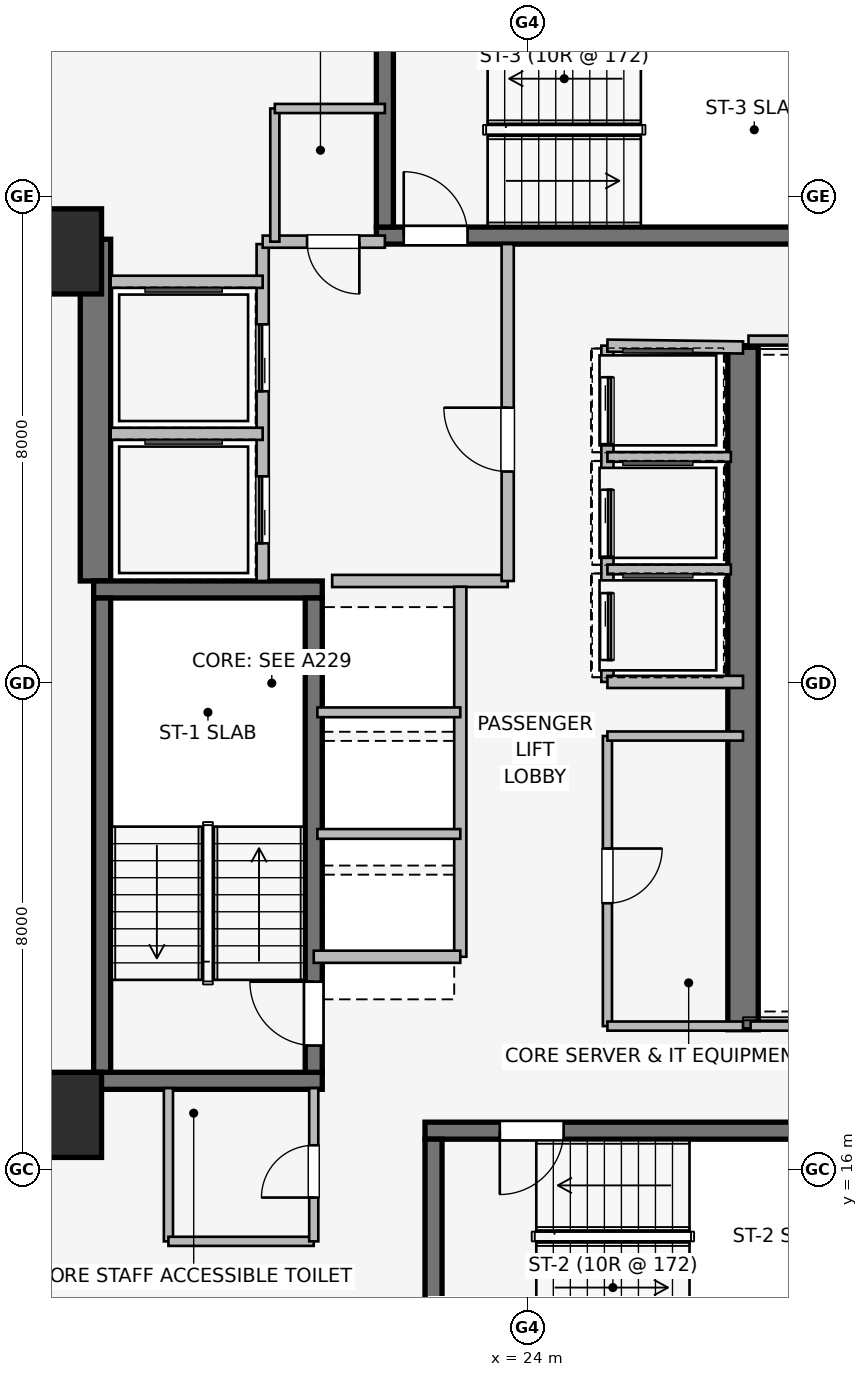
"""IFC4 building model, lengths in metres.
Left out: names, types, materials, properties, quantities, classifications, styles, units other than length and angle.
Written with IfcOpenShell. Run it as: python <this file> out.ifc"""

import sys

from ifc_helpers import new_model, si_unit, direction, frame, frame_2d, origin, origin_2d, place, context, subcontext, project, spatial, rectangle, extrude, element, fill, save


model = new_model("IFC4")
c1 = context("Model", 3, precision=1e-05, world=origin(), true_north=direction((0.0, 1.0)))
c2 = subcontext(c1, "Body", "Model", "MODEL_VIEW")
j1 = project(units=[si_unit("LENGTHUNIT", "METRE"), si_unit("PLANEANGLEUNIT", "RADIAN")], contexts=[c1])
p1 = place(None, origin())
s1 = spatial("IfcSite", under=j1, at=p1, CompositionType="ELEMENT")
p2 = place(p1, origin())
s2 = spatial("IfcBuilding", under=s1, at=p2, CompositionType="ELEMENT")
p3 = place(p2, frame((0.0, 0.0, 105.0)))
s3 = spatial("IfcBuildingStorey", under=s2, at=p3, CompositionType="ELEMENT", Elevation=105.0)
p4 = place(p3, frame((16.9, 25.68, 0.0), z_axis=(0.0, 0.0, 1.0), x_axis=(0.0, 1.0, 0.0)))
e1 = element("IfcWall", 1, at=p4, inside=s3, PredefinedType="SHEAR", context=c2, shape_type="SweptSolid", body=[
    extrude(rectangle(XDim=5.62, YDim=0.5, at=frame_2d((2.81, 0.0))), origin(), (0.0, 0.0, 1.0), 3.45),
])
p5 = place(p3, frame((27.55, 29.55, 0.0), z_axis=(0.0, 0.0, 1.0), x_axis=(0.0, -1.0, 0.0)))
e2 = element("IfcWall", 2, at=p5, inside=s3, PredefinedType="SHEAR", context=c2, shape_type="SweptSolid", body=[
    extrude(rectangle(XDim=11.25, YDim=0.5, at=frame_2d((5.625, 0.0))), origin(), (0.0, 0.0, 1.0), 3.45),
])
for number, where, z_axis, x_axis in (
    (3, (16.87, 17.46, 0.0), (0.0, 0.0, 1.0), (1.0, 0.0, 0.0)),
    (4, (20.63, 25.54, 0.0), (0.0, 0.0, 1.0), (-1.0, 0.0, 0.0)),
):
    element("IfcWall", number, at=place(p3, frame(where, z_axis=z_axis, x_axis=x_axis)), inside=s3, PredefinedType="SHEAR", context=c2, shape_type="SweptSolid", body=[
        extrude(rectangle(XDim=3.76, YDim=0.28, at=frame_2d((1.88, 0.0))), origin(), (0.0, 0.0, 1.0), 3.45),
    ])
p6 = place(p3, frame((17.01, 25.4, 0.0), z_axis=(0.0, 0.0, 1.0), x_axis=(0.0, -1.0, 0.0)))
e5 = element("IfcWall", 5, at=p6, inside=s3, PredefinedType="SHEAR", context=c2, shape_type="SweptSolid", body=[
    extrude(rectangle(XDim=7.8, YDim=0.28, at=frame_2d((3.9, 0.0))), origin(), (0.0, 0.0, 1.0), 3.45),
])
p7 = place(p3, frame((20.49, 17.6, 0.0), z_axis=(0.0, 0.0, 1.0), x_axis=(0.0, 1.0, 0.0)))
e6 = element("IfcWall", 6, at=p7, inside=s3, PredefinedType="SHEAR", context=c2, shape_type="SweptSolid", body=[
    extrude(rectangle(XDim=7.8, YDim=0.28, at=frame_2d((3.9, 0.0))), origin(), (0.0, 0.0, 1.0), 3.45),
])
p8 = place(p7, frame((0.44, 0.0, 0.0)))
e7 = element("IfcOpeningElement", 7, at=p8, cuts=e6, PredefinedType="OPENING", context=c2, shape_type="SweptSolid", body=[
    extrude(rectangle(XDim=1.05, YDim=2.0, at=frame_2d((0.525, 1.0))), frame((0.0, 0.15, 0.0), z_axis=(0.0, -1.0, 0.0), x_axis=(1.0, 0.0, 0.0)), (0.0, 0.0, 1.0), 0.3),
])
p9 = place(p3, frame((30.68, 16.64, 0.0), z_axis=(0.0, 0.0, 1.0), x_axis=(-1.0, 0.0, 0.0)))
e8 = element("IfcWall", 8, at=p9, inside=s3, PredefinedType="SHEAR", context=c2, shape_type="SweptSolid", body=[
    extrude(rectangle(XDim=8.36, YDim=0.28, at=frame_2d((4.18, 0.0))), origin(), (0.0, 0.0, 1.0), 3.45),
])
p10 = place(p9, frame((6.08, 0.0, 0.0)))
e9 = element("IfcOpeningElement", 9, at=p10, cuts=e8, PredefinedType="OPENING", context=c2, shape_type="SweptSolid", body=[
    extrude(rectangle(XDim=1.05, YDim=2.0, at=frame_2d((0.525, 1.0))), frame((0.0, 0.15, 0.0), z_axis=(0.0, -1.0, 0.0), x_axis=(1.0, 0.0, 0.0)), (0.0, 0.0, 1.0), 0.3),
])
p11 = place(p3, frame((22.46, 16.5, 0.0), z_axis=(0.0, 0.0, 1.0), x_axis=(0.0, -1.0, 0.0)))
e10 = element("IfcWall", 10, at=p11, inside=s3, PredefinedType="SHEAR", context=c2, shape_type="SweptSolid", body=[
    extrude(rectangle(XDim=3.2, YDim=0.28, at=frame_2d((1.6, 0.0))), origin(), (0.0, 0.0, 1.0), 3.45),
])
p12 = place(p3, frame((21.52, 31.36, 0.0), z_axis=(0.0, 0.0, 1.0), x_axis=(1.0, 0.0, 0.0)))
e11 = element("IfcWall", 11, at=p12, inside=s3, PredefinedType="SHEAR", context=c2, shape_type="SweptSolid", body=[
    extrude(rectangle(XDim=8.36, YDim=0.28, at=frame_2d((4.18, 0.0))), origin(), (0.0, 0.0, 1.0), 3.45),
])
p13 = place(p12, frame((0.45, 0.0, 0.0)))
e12 = element("IfcOpeningElement", 12, at=p13, cuts=e11, PredefinedType="OPENING", context=c2, shape_type="SweptSolid", body=[
    extrude(rectangle(XDim=1.05, YDim=2.0, at=frame_2d((0.525, 1.0))), frame((0.0, 0.15, 0.0), z_axis=(0.0, -1.0, 0.0), x_axis=(1.0, 0.0, 0.0)), (0.0, 0.0, 1.0), 0.3),
])
p14 = place(p3, frame((21.66, 34.7, 0.0), z_axis=(0.0, 0.0, 1.0), x_axis=(0.0, -1.0, 0.0)))
e13 = element("IfcWall", 13, at=p14, inside=s3, PredefinedType="SHEAR", context=c2, shape_type="SweptSolid", body=[
    extrude(rectangle(XDim=3.2, YDim=0.28, at=frame_2d((1.6, 0.0))), origin(), (0.0, 0.0, 1.0), 3.45),
])
for number, where, z_axis, x_axis in (
    (14, (16.3, 16.9, 0.0), (0.0, 0.0, 1.0), (1.0, 0.0, 0.0)),
    (15, (16.3, 31.1, 0.0), (0.0, 0.0, 1.0), (1.0, 0.0, 0.0)),
):
    element("IfcColumn", number, at=place(p3, frame(where, z_axis=z_axis, x_axis=x_axis)), inside=s3, PredefinedType="COLUMN", context=c2, shape_type="SweptSolid", body=[
        extrude(rectangle(XDim=1.4, YDim=1.4, at=origin_2d()), origin(), (0.0, 0.0, 1.0), 3.45),
    ])
p15 = place(p3, frame((19.65, 25.68, 0.0), z_axis=(0.0, 0.0, 1.0), x_axis=(0.0, 1.0, 0.0)))
e16 = element("IfcWall", 16, at=p15, inside=s3, PredefinedType="PARTITIONING", context=c2, shape_type="SweptSolid", body=[
    extrude(rectangle(XDim=5.54, YDim=0.2, at=frame_2d((2.77, 0.0))), origin(), (0.0, 0.0, 1.0), 3.19),
])
p16 = place(p15, frame((0.62, 0.0, 0.0)))
e17 = element("IfcOpeningElement", 17, at=p16, cuts=e16, PredefinedType="OPENING", context=c2, shape_type="SweptSolid", body=[
    extrude(rectangle(XDim=1.1, YDim=2.2, at=frame_2d((0.55, 1.1))), frame((0.0, 0.11, 0.0), z_axis=(0.0, -1.0, 0.0), x_axis=(1.0, 0.0, 0.0)), (0.0, 0.0, 1.0), 0.22),
])
p17 = place(p15, frame((3.12, 0.0, 0.0)))
e18 = element("IfcOpeningElement", 18, at=p17, cuts=e16, PredefinedType="OPENING", context=c2, shape_type="SweptSolid", body=[
    extrude(rectangle(XDim=1.1, YDim=2.2, at=frame_2d((0.55, 1.1))), frame((0.0, 0.11, 0.0), z_axis=(0.0, -1.0, 0.0), x_axis=(1.0, 0.0, 0.0)), (0.0, 0.0, 1.0), 0.22),
])
p18 = place(p3, frame((20.793, 25.68, 0.0), z_axis=(0.0, 0.0, 1.0), x_axis=(1.0, 0.0, 0.0)))
e19 = element("IfcWall", 19, at=p18, inside=s3, PredefinedType="PARTITIONING", context=c2, shape_type="SweptSolid", body=[
    extrude(rectangle(XDim=2.887, YDim=0.2, at=frame_2d((1.443, 0.0))), origin(), (0.0, 0.0, 1.0), 3.19),
])
p19 = place(p3, frame((23.68, 25.68, 0.0), z_axis=(0.0, 0.0, 1.0), x_axis=(0.0, 1.0, 0.0)))
e20 = element("IfcWall", 20, at=p19, inside=s3, PredefinedType="PARTITIONING", context=c2, shape_type="SweptSolid", body=[
    extrude(rectangle(XDim=5.54, YDim=0.2, at=frame_2d((2.77, 0.0))), origin(), (0.0, 0.0, 1.0), 3.19),
])
p20 = place(p19, frame((1.8, 0.0, 0.0)))
e21 = element("IfcOpeningElement", 21, at=p20, cuts=e20, PredefinedType="OPENING", context=c2, shape_type="SweptSolid", body=[
    extrude(rectangle(XDim=1.05, YDim=2.0, at=frame_2d((0.525, 1.0))), frame((0.0, 0.11, 0.0), z_axis=(0.0, -1.0, 0.0), x_axis=(1.0, 0.0, 0.0)), (0.0, 0.0, 1.0), 0.22),
])
p21 = place(p3, frame((21.66, 31.26, 0.0), z_axis=(0.0, 0.0, 1.0), x_axis=(-1.0, 0.0, 0.0)))
e22 = element("IfcWall", 22, at=p21, inside=s3, PredefinedType="PARTITIONING", context=c2, shape_type="SweptSolid", body=[
    extrude(rectangle(XDim=2.01, YDim=0.2, at=frame_2d((1.005, 0.0))), origin(), (0.0, 0.0, 1.0), 3.19),
])
p22 = place(p21, frame((0.42, 0.0, 0.0)))
e23 = element("IfcOpeningElement", 23, at=p22, cuts=e22, PredefinedType="OPENING", context=c2, shape_type="SweptSolid", body=[
    extrude(rectangle(XDim=0.86, YDim=2.0, at=frame_2d((0.43, 1.0))), frame((0.0, 0.11, 0.0), z_axis=(0.0, -1.0, 0.0), x_axis=(1.0, 0.0, 0.0)), (0.0, 0.0, 1.0), 0.22),
])
p23 = place(p3, frame((17.15, 28.1, 0.0), z_axis=(0.0, 0.0, 1.0), x_axis=(1.0, 0.0, 0.0)))
e24 = element("IfcWall", 24, at=p23, inside=s3, PredefinedType="PARTITIONING", context=c2, shape_type="SweptSolid", body=[
    extrude(rectangle(XDim=2.5, YDim=0.2, at=frame_2d((1.25, 0.0))), origin(), (0.0, 0.0, 1.0), 3.19),
])
p24 = place(p3, frame((19.65, 30.6, 0.0), z_axis=(0.0, 0.0, 1.0), x_axis=(-1.0, 0.0, 0.0)))
e25 = element("IfcWall", 25, at=p24, inside=s3, PredefinedType="PARTITIONING", context=c2, shape_type="SweptSolid", body=[
    extrude(rectangle(XDim=2.5, YDim=0.2, at=frame_2d((1.25, 0.0))), origin(), (0.0, 0.0, 1.0), 2.09),
])
p25 = place(p3, frame((22.9, 19.5, 0.0), z_axis=(0.0, 0.0, 1.0), x_axis=(0.0, 1.0, 0.0)))
e26 = element("IfcWall", 26, at=p25, inside=s3, PredefinedType="PARTITIONING", context=c2, shape_type="SweptSolid", body=[
    extrude(rectangle(XDim=6.085, YDim=0.2, at=frame_2d((3.042, 0.0))), origin(), (0.0, 0.0, 1.0), 3.19),
])
p26 = place(p3, frame((20.49, 19.5, 0.0), z_axis=(0.0, 0.0, 1.0), x_axis=(1.0, 0.0, 0.0)))
e27 = element("IfcWall", 27, at=p26, inside=s3, PredefinedType="PARTITIONING", context=c2, shape_type="SweptSolid", body=[
    extrude(rectangle(XDim=2.41, YDim=0.2, at=frame_2d((1.205, 0.0))), origin(), (0.0, 0.0, 1.0), 2.09),
])
for number, where, z_axis, x_axis in (
    (28, (20.55, 21.52, 0.0), (0.0, 0.0, 1.0), (1.0, 0.0, 0.0)),
    (29, (20.55, 23.52, 0.0), (0.0, 0.0, 1.0), (1.0, 0.0, 0.0)),
):
    element("IfcWall", number, at=place(p3, frame(where, z_axis=z_axis, x_axis=x_axis)), inside=s3, PredefinedType="PARTITIONING", context=c2, shape_type="SweptSolid", body=[
        extrude(rectangle(XDim=2.35, YDim=0.16, at=frame_2d((1.175, 0.0))), origin(), (0.0, 0.0, 1.0), 3.19),
    ])
p27 = place(p3, frame((25.32, 29.55, 0.0), z_axis=(0.0, 0.0, 1.0), x_axis=(0.0, -1.0, 0.0)))
e30 = element("IfcWall", 30, at=p27, inside=s3, PredefinedType="PARTITIONING", context=c2, shape_type="SweptSolid", body=[
    extrude(rectangle(XDim=5.53, YDim=0.2, at=frame_2d((2.765, 0.0))), origin(), (0.0, 0.0, 1.0), 3.19),
])
p28 = place(p27, frame((0.52, 0.0, 0.0)))
e31 = element("IfcOpeningElement", 31, at=p28, cuts=e30, PredefinedType="OPENING", context=c2, shape_type="SweptSolid", body=[
    extrude(rectangle(XDim=1.1, YDim=2.2, at=frame_2d((0.55, 1.1))), frame((0.0, 0.11, 0.0), z_axis=(0.0, -1.0, 0.0), x_axis=(1.0, 0.0, 0.0)), (0.0, 0.0, 1.0), 0.22),
])
p29 = place(p27, frame((2.37, 0.0, 0.0)))
e32 = element("IfcOpeningElement", 32, at=p29, cuts=e30, PredefinedType="OPENING", context=c2, shape_type="SweptSolid", body=[
    extrude(rectangle(XDim=1.1, YDim=2.2, at=frame_2d((0.55, 1.1))), frame((0.0, 0.11, 0.0), z_axis=(0.0, -1.0, 0.0), x_axis=(1.0, 0.0, 0.0)), (0.0, 0.0, 1.0), 0.22),
])
p30 = place(p27, frame((4.07, 0.0, 0.0)))
e33 = element("IfcOpeningElement", 33, at=p30, cuts=e30, PredefinedType="OPENING", context=c2, shape_type="SweptSolid", body=[
    extrude(rectangle(XDim=1.1, YDim=2.2, at=frame_2d((0.55, 1.1))), frame((0.0, 0.11, 0.0), z_axis=(0.0, -1.0, 0.0), x_axis=(1.0, 0.0, 0.0)), (0.0, 0.0, 1.0), 0.22),
])
p31 = place(p3, frame((27.55, 29.52, 0.0), z_axis=(0.0, 0.0, 1.0), x_axis=(-0.999909343457, 0.013464949556, 0.0)))
e34 = element("IfcWall", 34, at=p31, inside=s3, PredefinedType="PARTITIONING", context=c2, shape_type="SweptSolid", body=[
    extrude(rectangle(XDim=2.23, YDim=0.2, at=frame_2d((1.115, 0.0))), origin(), (0.0, 0.0, 1.0), 2.09),
])
p32 = place(p3, frame((25.32, 24.02, 0.0), z_axis=(0.0, 0.0, 1.0), x_axis=(1.0, 0.0, 0.0)))
e35 = element("IfcWall", 35, at=p32, inside=s3, PredefinedType="PARTITIONING", context=c2, shape_type="SweptSolid", body=[
    extrude(rectangle(XDim=2.23, YDim=0.2, at=frame_2d((1.115, 0.0))), origin(), (0.0, 0.0, 1.0), 3.19),
])
for number, where, z_axis, x_axis in (
    (36, (25.32, 25.87, 0.0), (0.0, 0.0, 1.0), (1.0, 0.0, 0.0)),
    (37, (25.32, 27.72, 0.0), (0.0, 0.0, 1.0), (1.0, 0.0, 0.0)),
):
    element("IfcWall", number, at=place(p3, frame(where, z_axis=z_axis, x_axis=x_axis)), inside=s3, PredefinedType="PARTITIONING", context=c2, shape_type="SweptSolid", body=[
        extrude(rectangle(XDim=2.03, YDim=0.16, at=frame_2d((1.015, 0.0))), origin(), (0.0, 0.0, 1.0), 3.19),
    ])
p33 = place(p3, frame((25.32, 23.13, 0.0), z_axis=(0.0, 0.0, 1.0), x_axis=(0.0, -1.0, 0.0)))
e38 = element("IfcWall", 38, at=p33, inside=s3, PredefinedType="PARTITIONING", context=c2, shape_type="SweptSolid", body=[
    extrude(rectangle(XDim=4.77, YDim=0.15, at=frame_2d((2.385, 0.0))), origin(), (0.0, 0.0, 1.0), 3.19),
])
p34 = place(p33, frame((1.85, 0.0, 0.0)))
e39 = element("IfcOpeningElement", 39, at=p34, cuts=e38, PredefinedType="OPENING", context=c2, shape_type="SweptSolid", body=[
    extrude(rectangle(XDim=0.9, YDim=2.0, at=frame_2d((0.45, 1.0))), frame((0.0, 0.085, 0.0), z_axis=(0.0, -1.0, 0.0), x_axis=(1.0, 0.0, 0.0)), (0.0, 0.0, 1.0), 0.17),
])
for number, where, z_axis, x_axis in (
    (40, (25.32, 23.13, 0.0), (0.0, 0.0, 1.0), (1.0, 0.0, 0.0)),
    (41, (25.32, 18.36, 0.0), (0.0, 0.0, 1.0), (1.0, 0.0, 0.0)),
):
    element("IfcWall", number, at=place(p3, frame(where, z_axis=z_axis, x_axis=x_axis)), inside=s3, PredefinedType="PARTITIONING", context=c2, shape_type="SweptSolid", body=[
        extrude(rectangle(XDim=2.23, YDim=0.15, at=frame_2d((1.115, 0.0))), origin(), (0.0, 0.0, 1.0), 3.19),
    ])
p35 = place(p3, frame((18.1, 17.34, 0.0), z_axis=(0.0, 0.0, 1.0), x_axis=(0.0, -1.0, 0.0)))
e42 = element("IfcWall", 42, at=p35, inside=s3, PredefinedType="PARTITIONING", context=c2, shape_type="SweptSolid", body=[
    extrude(rectangle(XDim=2.52, YDim=0.15, at=frame_2d((1.26, 0.0))), origin(), (0.0, 0.0, 1.0), 3.19),
])
p36 = place(p3, frame((18.1, 14.82, 0.0), z_axis=(0.0, 0.0, 1.0), x_axis=(1.0, 0.0, 0.0)))
e43 = element("IfcWall", 43, at=p36, inside=s3, PredefinedType="PARTITIONING", context=c2, shape_type="SweptSolid", body=[
    extrude(rectangle(XDim=2.39, YDim=0.15, at=frame_2d((1.195, 0.0))), origin(), (0.0, 0.0, 1.0), 3.19),
])
p37 = place(p3, frame((20.49, 14.82, 0.0), z_axis=(0.0, 0.0, 1.0), x_axis=(0.0, 1.0, 0.0)))
e44 = element("IfcWall", 44, at=p37, inside=s3, PredefinedType="PARTITIONING", context=c2, shape_type="SweptSolid", body=[
    extrude(rectangle(XDim=2.52, YDim=0.15, at=frame_2d((1.26, 0.0))), origin(), (0.0, 0.0, 1.0), 3.19),
])
p38 = place(p37, frame((0.72, 0.0, 0.0)))
e45 = element("IfcOpeningElement", 45, at=p38, cuts=e44, PredefinedType="OPENING", context=c2, shape_type="SweptSolid", body=[
    extrude(rectangle(XDim=0.86, YDim=2.0, at=frame_2d((0.43, 1.0))), frame((0.0, 0.085, 0.0), z_axis=(0.0, -1.0, 0.0), x_axis=(1.0, 0.0, 0.0)), (0.0, 0.0, 1.0), 0.17),
])
p39 = place(p3, frame((19.85, 33.45, 0.0), z_axis=(0.0, 0.0, 1.0), x_axis=(0.0, -1.0, 0.0)))
e46 = element("IfcWall", 46, at=p39, inside=s3, PredefinedType="PARTITIONING", context=c2, shape_type="SweptSolid", body=[
    extrude(rectangle(XDim=2.19, YDim=0.15, at=frame_2d((1.095, 0.0))), origin(), (0.0, 0.0, 1.0), 3.19),
])
p40 = place(p3, frame((21.66, 33.45, 0.0), z_axis=(0.0, 0.0, 1.0), x_axis=(-1.0, 0.0, 0.0)))
e47 = element("IfcWall", 47, at=p40, inside=s3, PredefinedType="PARTITIONING", context=c2, shape_type="SweptSolid", body=[
    extrude(rectangle(XDim=1.81, YDim=0.15, at=frame_2d((0.905, 0.0))), origin(), (0.0, 0.0, 1.0), 3.19),
])
p41 = place(p3, frame((27.675, 18.36, 0.0), z_axis=(0.0, 0.0, 1.0), x_axis=(1.0, 0.0, 0.0)))
e48 = element("IfcWall", 48, at=p41, inside=s3, PredefinedType="PARTITIONING", context=c2, shape_type="SweptSolid", body=[
    extrude(rectangle(XDim=12.165, YDim=0.15, at=frame_2d((6.083, 0.0))), origin(), (0.0, 0.0, 1.0), 2.331),
])
p42 = place(p3, frame((39.84, 29.64, 0.0), z_axis=(0.0, 0.0, 1.0), x_axis=(-1.0, 0.0, 0.0)))
e49 = element("IfcWall", 49, at=p42, inside=s3, PredefinedType="PARTITIONING", context=c2, shape_type="SweptSolid", body=[
    extrude(rectangle(XDim=12.2, YDim=0.15, at=frame_2d((6.1, 0.0))), origin(), (0.0, 0.0, 1.0), 2.331),
])
p43 = place(p8, origin())
e50 = element("IfcDoor", 50, at=p43, inside=s3, OperationType="SINGLE_SWING_RIGHT", PredefinedType="DOOR", context=c2, shape_type="SweptSolid", body=[
    extrude(rectangle(XDim=1.05, YDim=2.0, at=frame_2d((0.525, 1.0))), frame((0.0, 0.025, 0.0), z_axis=(0.0, -1.0, 0.0), x_axis=(1.0, 0.0, 0.0)), (0.0, 0.0, 1.0), 0.05),
])
fill(e7, e50)
p44 = place(p10, origin())
e51 = element("IfcDoor", 51, at=p44, inside=s3, OperationType="SINGLE_SWING_RIGHT", PredefinedType="DOOR", context=c2, shape_type="SweptSolid", body=[
    extrude(rectangle(XDim=1.05, YDim=2.0, at=frame_2d((0.525, 1.0))), frame((0.0, 0.025, 0.0), z_axis=(0.0, -1.0, 0.0), x_axis=(1.0, 0.0, 0.0)), (0.0, 0.0, 1.0), 0.05),
])
fill(e9, e51)
p45 = place(p13, origin())
e52 = element("IfcDoor", 52, at=p45, inside=s3, OperationType="SINGLE_SWING_LEFT", PredefinedType="DOOR", context=c2, shape_type="SweptSolid", body=[
    extrude(rectangle(XDim=1.05, YDim=2.0, at=frame_2d((0.525, 1.0))), frame((0.0, 0.025, 0.0), z_axis=(0.0, -1.0, 0.0), x_axis=(1.0, 0.0, 0.0)), (0.0, 0.0, 1.0), 0.05),
])
fill(e12, e52)
p46 = place(p16, origin())
e53 = element("IfcDoor", 53, at=p46, inside=s3, OperationType="SLIDING_TO_LEFT", PredefinedType="DOOR", context=c2, shape_type="SweptSolid", body=[
    extrude(rectangle(XDim=1.1, YDim=2.2, at=frame_2d((0.55, 1.1))), frame((0.0, 0.025, 0.0), z_axis=(0.0, -1.0, 0.0), x_axis=(1.0, 0.0, 0.0)), (0.0, 0.0, 1.0), 0.05),
])
fill(e17, e53)
p47 = place(p17, origin())
e54 = element("IfcDoor", 54, at=p47, inside=s3, OperationType="SLIDING_TO_LEFT", PredefinedType="DOOR", context=c2, shape_type="SweptSolid", body=[
    extrude(rectangle(XDim=1.1, YDim=2.2, at=frame_2d((0.55, 1.1))), frame((0.0, 0.025, 0.0), z_axis=(0.0, -1.0, 0.0), x_axis=(1.0, 0.0, 0.0)), (0.0, 0.0, 1.0), 0.05),
])
fill(e18, e54)
p48 = place(p20, origin())
e55 = element("IfcDoor", 55, at=p48, inside=s3, OperationType="SINGLE_SWING_RIGHT", PredefinedType="DOOR", context=c2, shape_type="SweptSolid", body=[
    extrude(rectangle(XDim=1.05, YDim=2.0, at=frame_2d((0.525, 1.0))), frame((0.0, 0.025, 0.0), z_axis=(0.0, -1.0, 0.0), x_axis=(1.0, 0.0, 0.0)), (0.0, 0.0, 1.0), 0.05),
])
fill(e21, e55)
p49 = place(p22, origin())
e56 = element("IfcDoor", 56, at=p49, inside=s3, OperationType="SINGLE_SWING_LEFT", PredefinedType="DOOR", context=c2, shape_type="SweptSolid", body=[
    extrude(rectangle(XDim=0.86, YDim=2.0, at=frame_2d((0.43, 1.0))), frame((0.0, 0.025, 0.0), z_axis=(0.0, -1.0, 0.0), x_axis=(1.0, 0.0, 0.0)), (0.0, 0.0, 1.0), 0.05),
])
fill(e23, e56)
p50 = place(p28, origin())
e57 = element("IfcDoor", 57, at=p50, inside=s3, OperationType="SLIDING_TO_LEFT", PredefinedType="DOOR", context=c2, shape_type="SweptSolid", body=[
    extrude(rectangle(XDim=1.1, YDim=2.2, at=frame_2d((0.55, 1.1))), frame((0.0, 0.025, 0.0), z_axis=(0.0, -1.0, 0.0), x_axis=(1.0, 0.0, 0.0)), (0.0, 0.0, 1.0), 0.05),
])
fill(e31, e57)
p51 = place(p29, origin())
e58 = element("IfcDoor", 58, at=p51, inside=s3, OperationType="SLIDING_TO_LEFT", PredefinedType="DOOR", context=c2, shape_type="SweptSolid", body=[
    extrude(rectangle(XDim=1.1, YDim=2.2, at=frame_2d((0.55, 1.1))), frame((0.0, 0.025, 0.0), z_axis=(0.0, -1.0, 0.0), x_axis=(1.0, 0.0, 0.0)), (0.0, 0.0, 1.0), 0.05),
])
fill(e32, e58)
p52 = place(p30, origin())
e59 = element("IfcDoor", 59, at=p52, inside=s3, OperationType="SLIDING_TO_LEFT", PredefinedType="DOOR", context=c2, shape_type="SweptSolid", body=[
    extrude(rectangle(XDim=1.1, YDim=2.2, at=frame_2d((0.55, 1.1))), frame((0.0, 0.025, 0.0), z_axis=(0.0, -1.0, 0.0), x_axis=(1.0, 0.0, 0.0)), (0.0, 0.0, 1.0), 0.05),
])
fill(e33, e59)
p53 = place(p34, origin())
e60 = element("IfcDoor", 60, at=p53, inside=s3, OperationType="SINGLE_SWING_LEFT", PredefinedType="DOOR", context=c2, shape_type="SweptSolid", body=[
    extrude(rectangle(XDim=0.9, YDim=2.0, at=frame_2d((0.45, 1.0))), frame((0.0, 0.025, 0.0), z_axis=(0.0, -1.0, 0.0), x_axis=(1.0, 0.0, 0.0)), (0.0, 0.0, 1.0), 0.05),
])
fill(e39, e60)
p54 = place(p38, origin())
e61 = element("IfcDoor", 61, at=p54, inside=s3, OperationType="SINGLE_SWING_LEFT", PredefinedType="DOOR", context=c2, shape_type="SweptSolid", body=[
    extrude(rectangle(XDim=0.86, YDim=2.0, at=frame_2d((0.43, 1.0))), frame((0.0, 0.025, 0.0), z_axis=(0.0, -1.0, 0.0), x_axis=(1.0, 0.0, 0.0)), (0.0, 0.0, 1.0), 0.05),
])
fill(e45, e61)
save(model, sys.argv[1])
